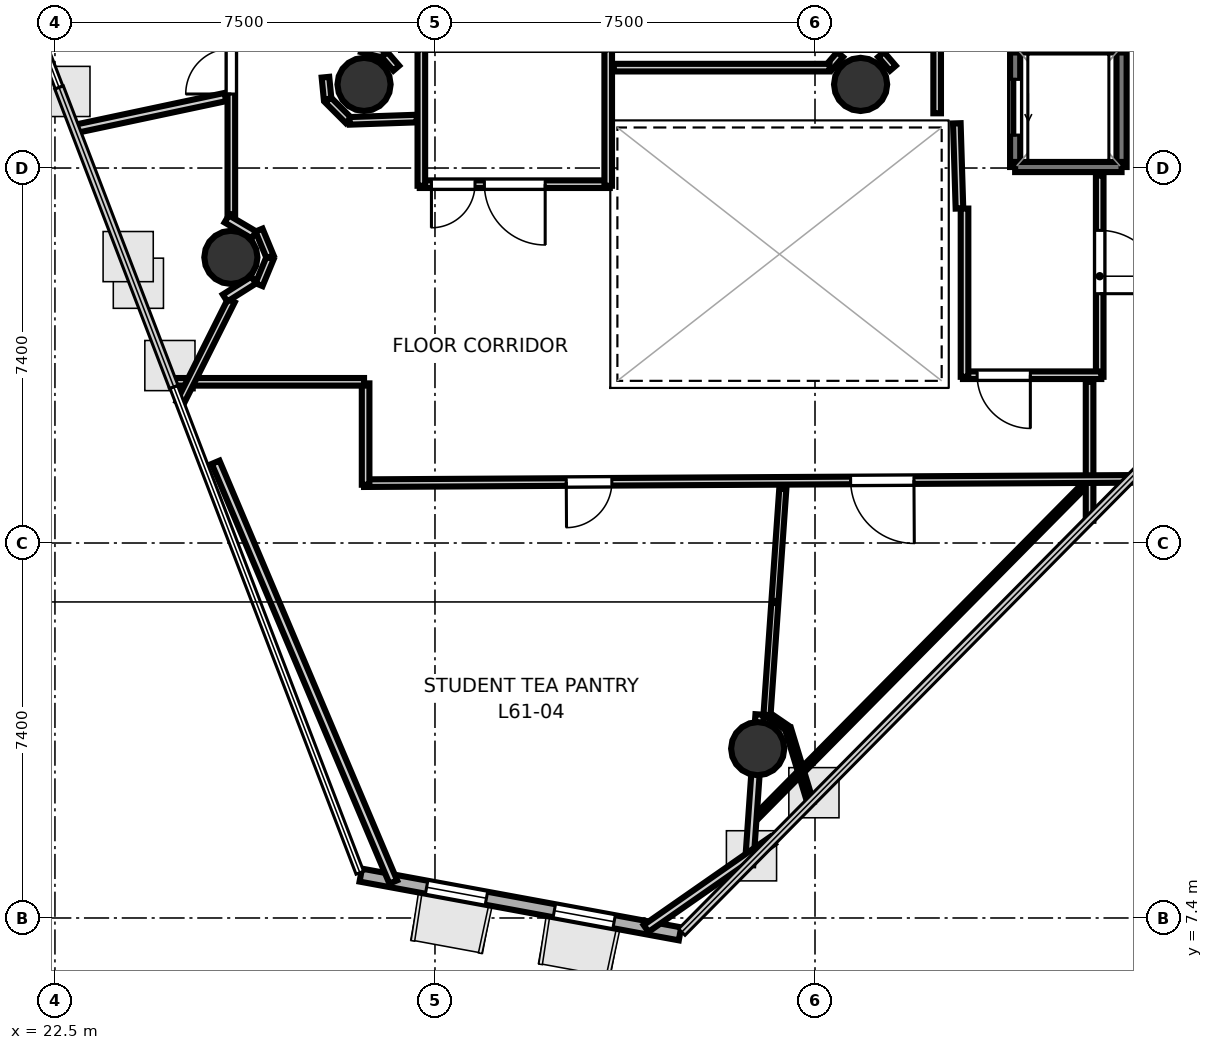
"""IFC4 building model, lengths in metres.
Left out: names, types, materials, properties, quantities, classifications, styles, units other than length and angle.
Written with IfcOpenShell. Run it as: python <this file> out.ifc"""

import sys

from ifc_helpers import new_model, si_unit, direction, frame, frame_2d, origin, origin_2d, place, context, subcontext, project, spatial, rectangle, hollow_circle, extrude, element, fill, save


model = new_model("IFC4")
c1 = context("Model", 3, precision=1e-05, world=origin(), true_north=direction((0.0, 1.0)))
c2 = subcontext(c1, "Body", "Model", "MODEL_VIEW")
j1 = project(units=[si_unit("LENGTHUNIT", "METRE"), si_unit("PLANEANGLEUNIT", "RADIAN")], contexts=[c1])
p1 = place(None, origin())
s1 = spatial("IfcSite", under=j1, at=p1, CompositionType="ELEMENT")
p2 = place(p1, origin())
s2 = spatial("IfcBuilding", under=s1, at=p2, CompositionType="ELEMENT")
p3 = place(p2, frame((0.0, 0.0, 239.0)))
s3 = spatial("IfcBuildingStorey", under=s2, at=p3, CompositionType="ELEMENT", Elevation=239.0)
for number, where, z_axis, x_axis in (
    (1, (28.6, 23.85, 0.0), (0.0, 0.0, 1.0), (1.0, 0.0, 0.0)),
    (2, (38.4, 23.85, 0.0), (0.0, 0.0, 1.0), (1.0, 0.0, 0.0)),
    (3, (25.972, 20.437, 0.0), (0.0, 0.0, 1.0), (1.0, 0.0, 0.0)),
    (4, (36.369, 10.742, 0.0), (0.0, 0.0, 1.0), (1.0, 0.0, 0.0)),
):
    element("IfcColumn", number, at=place(p3, frame(where, z_axis=z_axis, x_axis=x_axis)), inside=s3, PredefinedType="COLUMN", context=c2, shape_type="SweptSolid", body=[
        extrude(hollow_circle(Radius=0.525, WallThickness=0.028, at=origin_2d()), origin(), (0.0, 0.0, 1.0), 3.7),
    ])
p4 = place(p3, frame((28.535, 8.246, 0.0), z_axis=(0.0, 0.0, 1.0), x_axis=(0.983492119214, -0.180950964196, 0.0)))
e5 = element("IfcWall", 5, at=p4, inside=s3, PredefinedType="SOLIDWALL", context=c2, shape_type="SweptSolid", body=[
    extrude(rectangle(XDim=6.406, YDim=0.26, at=frame_2d((3.203, 0.0))), origin(), (0.0, 0.0, 1.0), 3.52),
])
p5 = place(p4, frame((1.322, 0.0, 0.9)))
e6 = element("IfcOpeningElement", 6, at=p5, cuts=e5, PredefinedType="OPENING", context=c2, shape_type="SweptSolid", body=[
    extrude(rectangle(XDim=1.2, YDim=2.0, at=frame_2d((0.6, 1.0))), frame((0.0, 0.14, 0.0), z_axis=(0.0, -1.0, 0.0), x_axis=(1.0, 0.0, 0.0)), (0.0, 0.0, 1.0), 0.28),
])
p6 = place(p4, frame((3.884, 0.0, 0.9)))
e7 = element("IfcOpeningElement", 7, at=p6, cuts=e5, PredefinedType="OPENING", context=c2, shape_type="SweptSolid", body=[
    extrude(rectangle(XDim=1.2, YDim=2.0, at=frame_2d((0.6, 1.0))), frame((0.0, 0.14, 0.0), z_axis=(0.0, -1.0, 0.0), x_axis=(1.0, 0.0, 0.0)), (0.0, 0.0, 1.0), 0.28),
])
p7 = place(p3, frame((43.55, 22.22, 0.0), z_axis=(0.0, 0.0, 1.0), x_axis=(0.0, 1.0, 0.0)))
e8 = element("IfcWall", 8, at=p7, inside=s3, PredefinedType="SOLIDWALL", context=c2, shape_type="SweptSolid", body=[
    extrude(rectangle(XDim=2.36, YDim=0.2, at=frame_2d((1.18, 0.0))), origin(), (0.0, 0.0, 1.0), 3.52),
])
p8 = place(p3, frame((41.45, 22.22, 0.0), z_axis=(0.0, 0.0, 1.0), x_axis=(0.0, 1.0, 0.0)))
e9 = element("IfcWall", 9, at=p8, inside=s3, PredefinedType="SOLIDWALL", context=c2, shape_type="SweptSolid", body=[
    extrude(rectangle(XDim=2.36, YDim=0.2, at=frame_2d((1.18, 0.0))), origin(), (0.0, 0.0, 1.0), 3.52),
])
p9 = place(p8, frame((0.63, 0.0, 0.0)))
e10 = element("IfcOpeningElement", 10, at=p9, cuts=e9, PredefinedType="OPENING", context=c2, shape_type="SweptSolid", body=[
    extrude(rectangle(XDim=1.1, YDim=2.15, at=frame_2d((0.55, 1.075))), frame((0.0, 0.11, 0.0), z_axis=(0.0, -1.0, 0.0), x_axis=(1.0, 0.0, 0.0)), (0.0, 0.0, 1.0), 0.22),
])
for number, where, z_axis, x_axis in (
    (11, (41.45, 24.58, 0.0), (0.0, 0.0, 1.0), (1.0, 0.0, 0.0)),
    (12, (41.45, 22.22, 0.0), (0.0, 0.0, 1.0), (1.0, 0.0, 0.0)),
):
    element("IfcWall", number, at=place(p3, frame(where, z_axis=z_axis, x_axis=x_axis)), inside=s3, PredefinedType="SOLIDWALL", context=c2, shape_type="SweptSolid", body=[
        extrude(rectangle(XDim=2.1, YDim=0.2, at=frame_2d((1.05, 0.0))), origin(), (0.0, 0.0, 1.0), 3.52),
    ])
p10 = place(p3, frame((33.45, 21.881, 0.0), z_axis=(0.0, 0.0, 1.0), x_axis=(-1.0, 0.0, 0.0)))
e13 = element("IfcWall", 13, at=p10, inside=s3, PredefinedType="PARTITIONING", context=c2, shape_type="SweptSolid", body=[
    extrude(rectangle(XDim=3.75, YDim=0.15, at=frame_2d((1.875, 0.0))), origin(), (0.0, 0.0, 1.0), 2.84),
])
p11 = place(p10, frame((1.275, 0.0, 0.0)))
e14 = element("IfcOpeningElement", 14, at=p11, cuts=e13, PredefinedType="OPENING", context=c2, shape_type="SweptSolid", body=[
    extrude(rectangle(XDim=1.2, YDim=2.15, at=frame_2d((0.6, 1.075))), frame((0.0, 0.085, 0.0), z_axis=(0.0, -1.0, 0.0), x_axis=(1.0, 0.0, 0.0)), (0.0, 0.0, 1.0), 0.17),
])
p12 = place(p10, frame((2.66, 0.0, 0.0)))
e15 = element("IfcOpeningElement", 15, at=p12, cuts=e13, PredefinedType="OPENING", context=c2, shape_type="SweptSolid", body=[
    extrude(rectangle(XDim=0.86, YDim=2.05, at=frame_2d((0.43, 1.025))), frame((0.0, 0.085, 0.0), z_axis=(0.0, -1.0, 0.0), x_axis=(1.0, 0.0, 0.0)), (0.0, 0.0, 1.0), 0.17),
])
for number, where, z_axis, x_axis in (
    (16, (29.731, 21.85, 0.0), (0.0, 0.0, 1.0), (0.0, 1.0, 0.0)),
    (17, (33.419, 24.542, 0.0), (0.0, 0.0, 1.0), (0.0, -1.0, 0.0)),
):
    element("IfcWall", number, at=place(p3, frame(where, z_axis=z_axis, x_axis=x_axis)), inside=s3, PredefinedType="PARTITIONING", context=c2, shape_type="SweptSolid", body=[
        extrude(rectangle(XDim=2.692, YDim=0.15, at=frame_2d((1.346, 0.0))), origin(), (0.0, 0.0, 1.0), 2.84),
    ])
p13 = place(p3, frame((40.351, 21.401, 0.0), z_axis=(0.0, 0.0, 1.0), x_axis=(-0.031058045979, 0.999517582527, 0.0)))
e18 = element("IfcWall", 18, at=p13, inside=s3, PredefinedType="PARTITIONING", context=c2, shape_type="SweptSolid", body=[
    extrude(rectangle(XDim=1.682, YDim=0.15, at=frame_2d((0.841, 0.0))), origin(), (0.0, 0.0, 1.0), 2.84),
])
p14 = place(p3, frame((39.911, 23.28, 0.0), z_axis=(0.0, 0.0, 1.0), x_axis=(0.0, 1.0, 0.0)))
e19 = element("IfcWall", 19, at=p14, inside=s3, PredefinedType="PARTITIONING", context=c2, shape_type="SweptSolid", body=[
    extrude(rectangle(XDim=1.48, YDim=0.15, at=frame_2d((0.74, 0.0))), origin(), (0.0, 0.0, 1.0), 2.84),
])
p15 = place(p3, frame((43.119, 22.05, 0.0), z_axis=(0.0, 0.0, 1.0), x_axis=(0.0, -1.0, 0.0)))
e20 = element("IfcWall", 20, at=p15, inside=s3, PredefinedType="PARTITIONING", context=c2, shape_type="SweptSolid", body=[
    extrude(rectangle(XDim=3.97, YDim=0.15, at=frame_2d((1.985, 0.0))), origin(), (0.0, 0.0, 1.0), 2.84),
])
p16 = place(p15, frame((1.08, 0.0, 0.0)))
e21 = element("IfcOpeningElement", 21, at=p16, cuts=e20, PredefinedType="OPENING", context=c2, shape_type="SweptSolid", body=[
    extrude(rectangle(XDim=1.25, YDim=2.2, at=frame_2d((0.625, 1.1))), frame((0.0, 0.085, 0.0), z_axis=(0.0, -1.0, 0.0), x_axis=(1.0, 0.0, 0.0)), (0.0, 0.0, 1.0), 0.17),
])
p17 = place(p3, frame((43.15, 18.111, 0.0), z_axis=(0.0, 0.0, 1.0), x_axis=(-1.0, 0.0, 0.0)))
e22 = element("IfcWall", 22, at=p17, inside=s3, PredefinedType="PARTITIONING", context=c2, shape_type="SweptSolid", body=[
    extrude(rectangle(XDim=2.73, YDim=0.15, at=frame_2d((1.365, 0.0))), origin(), (0.0, 0.0, 1.0), 2.84),
])
p18 = place(p17, frame((1.4, 0.0, 0.0)))
e23 = element("IfcOpeningElement", 23, at=p18, cuts=e22, PredefinedType="OPENING", context=c2, shape_type="SweptSolid", body=[
    extrude(rectangle(XDim=1.05, YDim=2.15, at=frame_2d((0.525, 1.075))), frame((0.0, 0.085, 0.0), z_axis=(0.0, -1.0, 0.0), x_axis=(1.0, 0.0, 0.0)), (0.0, 0.0, 1.0), 0.17),
])
p19 = place(p3, frame((40.451, 18.08, 0.0), z_axis=(0.0, 0.0, 1.0), x_axis=(0.0, 1.0, 0.0)))
e24 = element("IfcWall", 24, at=p19, inside=s3, PredefinedType="PARTITIONING", context=c2, shape_type="SweptSolid", body=[
    extrude(rectangle(XDim=3.32, YDim=0.15, at=frame_2d((1.66, 0.0))), origin(), (0.0, 0.0, 1.0), 2.84),
])
p20 = place(p3, frame((29.236, 24.17, 0.0), z_axis=(0.0, 0.0, 1.0), x_axis=(-0.652260263346, 0.757995084984, 0.0)))
e25 = element("IfcWall", 25, at=p20, inside=s3, PredefinedType="PARTITIONING", context=c2, shape_type="SweptSolid", body=[
    extrude(rectangle(XDim=0.355, YDim=0.15, at=frame_2d((0.178, 0.0))), origin(), (0.0, 0.0, 1.0), 2.84),
])
p21 = place(p3, frame((28.988, 24.45, 0.0), z_axis=(0.0, 0.0, 1.0), x_axis=(-0.968704505916, 0.248216800836, 0.0)))
e26 = element("IfcWall", 26, at=p21, inside=s3, PredefinedType="PARTITIONING", context=c2, shape_type="SweptSolid", body=[
    extrude(rectangle(XDim=0.445, YDim=0.15, at=frame_2d((0.222, 0.0))), origin(), (0.0, 0.0, 1.0), 2.84),
])
p22 = place(p3, frame((39.036, 24.17, 0.0), z_axis=(0.0, 0.0, 1.0), x_axis=(-0.652260263346, 0.757995084984, 0.0)))
e27 = element("IfcWall", 27, at=p22, inside=s3, PredefinedType="PARTITIONING", context=c2, shape_type="SweptSolid", body=[
    extrude(rectangle(XDim=0.355, YDim=0.15, at=frame_2d((0.178, 0.0))), origin(), (0.0, 0.0, 1.0), 2.84),
])
p23 = place(p3, frame((37.996, 24.44, 0.0), z_axis=(0.0, 0.0, 1.0), x_axis=(-0.652425645794, -0.757852740782, 0.0)))
e28 = element("IfcWall", 28, at=p23, inside=s3, PredefinedType="PARTITIONING", context=c2, shape_type="SweptSolid", body=[
    extrude(rectangle(XDim=0.32, YDim=0.15, at=frame_2d((0.16, 0.0))), origin(), (0.0, 0.0, 1.0), 2.84),
])
p24 = place(p3, frame((37.787, 24.181, 0.0), z_axis=(0.0, 0.0, 1.0), x_axis=(-1.0, 0.0, 0.0)))
e29 = element("IfcWall", 29, at=p24, inside=s3, PredefinedType="PARTITIONING", context=c2, shape_type="SweptSolid", body=[
    extrude(rectangle(XDim=4.257, YDim=0.15, at=frame_2d((2.129, 0.0))), origin(), (0.0, 0.0, 1.0), 2.84),
])
p25 = place(p3, frame((27.838, 23.992, 0.0), z_axis=(0.0, 0.0, 1.0), x_axis=(0.098273407977, -0.995159453196, 0.0)))
e30 = element("IfcWall", 30, at=p25, inside=s3, PredefinedType="PARTITIONING", context=c2, shape_type="SweptSolid", body=[
    extrude(rectangle(XDim=0.432, YDim=0.15, at=frame_2d((0.216, 0.0))), origin(), (0.0, 0.0, 1.0), 2.84),
])
p26 = place(p3, frame((27.89, 23.543, 0.0), z_axis=(0.0, 0.0, 1.0), x_axis=(0.707106781187, -0.707106781187, 0.0)))
e31 = element("IfcWall", 31, at=p26, inside=s3, PredefinedType="PARTITIONING", context=c2, shape_type="SweptSolid", body=[
    extrude(rectangle(XDim=0.57, YDim=0.15, at=frame_2d((0.285, 0.0))), origin(), (0.0, 0.0, 1.0), 2.84),
])
p27 = place(p3, frame((28.316, 23.131, 0.0), z_axis=(0.0, 0.0, 1.0), x_axis=(0.999405342193, 0.034481328227, 0.0)))
e32 = element("IfcWall", 32, at=p27, inside=s3, PredefinedType="PARTITIONING", context=c2, shape_type="SweptSolid", body=[
    extrude(rectangle(XDim=1.324, YDim=0.15, at=frame_2d((0.662, 0.0))), origin(), (0.0, 0.0, 1.0), 2.84),
])
p28 = place(p3, frame((42.919, 17.98, 0.0), z_axis=(0.0, 0.0, 1.0), x_axis=(0.0, -1.0, 0.0)))
e33 = element("IfcWall", 33, at=p28, inside=s3, PredefinedType="PARTITIONING", context=c2, shape_type="SweptSolid", body=[
    extrude(rectangle(XDim=2.741, YDim=0.15, at=frame_2d((1.371, 0.0))), origin(), (0.0, 0.0, 1.0), 2.84),
])
p29 = place(p3, frame((43.736, 16.065, 0.0), z_axis=(0.0, 0.0, 1.0), x_axis=(-0.99998451794, -0.005564519729, 0.0)))
e34 = element("IfcWall", 34, at=p29, inside=s3, PredefinedType="PARTITIONING", context=c2, shape_type="SweptSolid", body=[
    extrude(rectangle(XDim=15.137, YDim=0.15, at=frame_2d((7.568, 0.0))), origin(), (0.0, 0.0, 1.0), 2.84),
])
p30 = place(p29, frame((4.283, 0.0, 0.0)))
e35 = element("IfcOpeningElement", 35, at=p30, cuts=e34, PredefinedType="OPENING", context=c2, shape_type="SweptSolid", body=[
    extrude(rectangle(XDim=1.25, YDim=2.2, at=frame_2d((0.625, 1.1))), frame((0.0, 0.085, 0.0), z_axis=(0.0, -1.0, 0.0), x_axis=(1.0, 0.0, 0.0)), (0.0, 0.0, 1.0), 0.17),
])
p31 = place(p29, frame((10.246, 0.0, 0.0)))
e36 = element("IfcOpeningElement", 36, at=p31, cuts=e34, PredefinedType="OPENING", context=c2, shape_type="SweptSolid", body=[
    extrude(rectangle(XDim=0.9, YDim=2.1, at=frame_2d((0.45, 1.05))), frame((0.0, 0.085, 0.0), z_axis=(0.0, -1.0, 0.0), x_axis=(1.0, 0.0, 0.0)), (0.0, 0.0, 1.0), 0.17),
])
p32 = place(p3, frame((28.631, 15.95, 0.0), z_axis=(0.0, 0.0, 1.0), x_axis=(0.0, 1.0, 0.0)))
e37 = element("IfcWall", 37, at=p32, inside=s3, PredefinedType="PARTITIONING", context=c2, shape_type="SweptSolid", body=[
    extrude(rectangle(XDim=2.0, YDim=0.15, at=frame_2d((1.0, 0.0))), origin(), (0.0, 0.0, 1.0), 2.84),
])
p33 = place(p3, frame((28.6, 17.981, 0.0), z_axis=(0.0, 0.0, 1.0), x_axis=(-1.0, 0.0, 0.0)))
e38 = element("IfcWall", 38, at=p33, inside=s3, PredefinedType="PARTITIONING", context=c2, shape_type="SweptSolid", body=[
    extrude(rectangle(XDim=3.814, YDim=0.15, at=frame_2d((1.907, 0.0))), origin(), (0.0, 0.0, 1.0), 2.84),
])
p34 = place(p3, frame((24.967, 17.562, 0.0), z_axis=(0.0, 0.0, 1.0), x_axis=(0.448119529696, 0.893973650118, 0.0)))
e39 = element("IfcWall", 39, at=p34, inside=s3, PredefinedType="PARTITIONING", context=c2, shape_type="SweptSolid", body=[
    extrude(rectangle(XDim=2.263, YDim=0.15, at=frame_2d((1.132, 0.0))), origin(), (0.0, 0.0, 1.0), 2.84),
])
p35 = place(p3, frame((26.527, 19.898, 0.0), z_axis=(0.0, 0.0, 1.0), x_axis=(0.382729887879, 0.923860288639, 0.0)))
e40 = element("IfcWall", 40, at=p35, inside=s3, PredefinedType="PARTITIONING", context=c2, shape_type="SweptSolid", body=[
    extrude(rectangle(XDim=0.57, YDim=0.15, at=frame_2d((0.285, 0.0))), origin(), (0.0, 0.0, 1.0), 2.84),
])
p36 = place(p3, frame((26.746, 20.449, 0.0), z_axis=(0.0, 0.0, 1.0), x_axis=(-0.382881317414, 0.923797541009, 0.0)))
e41 = element("IfcWall", 41, at=p36, inside=s3, PredefinedType="PARTITIONING", context=c2, shape_type="SweptSolid", body=[
    extrude(rectangle(XDim=0.57, YDim=0.15, at=frame_2d((0.285, 0.0))), origin(), (0.0, 0.0, 1.0), 2.84),
])
p37 = place(p3, frame((25.981, 21.289, 0.0), z_axis=(0.0, 0.0, 1.0), x_axis=(0.0, 1.0, 0.0)))
e42 = element("IfcWall", 42, at=p37, inside=s3, PredefinedType="PARTITIONING", context=c2, shape_type="SweptSolid", body=[
    extrude(rectangle(XDim=3.824, YDim=0.15, at=frame_2d((1.912, 0.0))), origin(), (0.0, 0.0, 1.0), 2.84),
])
p38 = place(p37, frame((2.371, 0.0, 0.0)))
e43 = element("IfcOpeningElement", 43, at=p38, cuts=e42, PredefinedType="OPENING", context=c2, shape_type="SweptSolid", body=[
    extrude(rectangle(XDim=0.9, YDim=2.1, at=frame_2d((0.45, 1.05))), frame((0.0, 0.085, 0.0), z_axis=(0.0, -1.0, 0.0), x_axis=(1.0, 0.0, 0.0)), (0.0, 0.0, 1.0), 0.17),
])
p39 = place(p3, frame((37.413, 9.667, 0.0), z_axis=(0.0, 0.0, 1.0), x_axis=(-0.29036160912, 0.956916995329, 0.0)))
e44 = element("IfcWall", 44, at=p39, inside=s3, PredefinedType="PARTITIONING", context=c2, shape_type="SweptSolid", body=[
    extrude(rectangle(XDim=1.53, YDim=0.12, at=frame_2d((0.765, 0.0))), origin(), (0.0, 0.0, 1.0), 2.84),
])
p40 = place(p3, frame((36.956, 11.148, 0.0), z_axis=(0.0, 0.0, 1.0), x_axis=(-0.825070075803, 0.565030415123, 0.0)))
e45 = element("IfcWall", 45, at=p40, inside=s3, PredefinedType="PARTITIONING", context=c2, shape_type="SweptSolid", body=[
    extrude(rectangle(XDim=0.505, YDim=0.105, at=frame_2d((0.252, 0.0))), origin(), (0.0, 0.0, 1.0), 2.84),
])
p41 = place(p3, frame((36.553, 11.406, 0.0), z_axis=(0.0, 0.0, 1.0), x_axis=(0.069757428916, 0.997563983467, 0.0)))
e46 = element("IfcWall", 46, at=p41, inside=s3, PredefinedType="PARTITIONING", context=c2, shape_type="SweptSolid", body=[
    extrude(rectangle(XDim=4.473, YDim=0.14, at=frame_2d((2.236, 0.0))), origin(), (0.0, 0.0, 1.0), 2.84),
])
p42 = place(p3, frame((42.77, 15.892, 0.0), z_axis=(0.0, 0.0, 1.0), x_axis=(-0.703226719555, -0.71096566788, 0.0)))
e47 = element("IfcWall", 47, at=p42, inside=s3, PredefinedType="PARTITIONING", context=c2, shape_type="SweptSolid", body=[
    extrude(rectangle(XDim=9.117, YDim=0.105, at=frame_2d((4.559, 0.0))), origin(), (0.0, 0.0, 1.0), 2.84),
])
p43 = place(p3, frame((25.864, 23.601, 0.0), z_axis=(0.0, 0.0, 1.0), x_axis=(-0.978142599983, -0.207935216108, 0.0)))
e48 = element("IfcWall", 48, at=p43, inside=s3, PredefinedType="PLUMBINGWALL", context=c2, shape_type="SweptSolid", body=[
    extrude(rectangle(XDim=3.055, YDim=0.165, at=frame_2d((1.528, 0.0))), origin(), (0.0, 0.0, 1.0), 2.84),
])
p44 = place(p3, frame((25.89, 21.196, 0.0), z_axis=(0.0, 0.0, 1.0), x_axis=(0.861480264841, -0.507791052785, 0.0)))
e49 = element("IfcWall", 49, at=p44, inside=s3, PredefinedType="PLUMBINGWALL", context=c2, shape_type="SweptSolid", body=[
    extrude(rectangle(XDim=0.623, YDim=0.165, at=frame_2d((0.311, 0.0))), origin(), (0.0, 0.0, 1.0), 2.84),
])
p45 = place(p3, frame((26.422, 19.991, 0.0), z_axis=(0.0, 0.0, 1.0), x_axis=(-0.84577514661, -0.533539503108, 0.0)))
e50 = element("IfcWall", 50, at=p45, inside=s3, PredefinedType="PLUMBINGWALL", context=c2, shape_type="SweptSolid", body=[
    extrude(rectangle(XDim=0.668, YDim=0.165, at=frame_2d((0.334, 0.0))), origin(), (0.0, 0.0, 1.0), 2.84),
])
p46 = place(p3, frame((36.407, 11.416, 0.0), z_axis=(0.0, 0.0, 1.0), x_axis=(-0.069731163391, -0.997565819809, 0.0)))
e51 = element("IfcWall", 51, at=p46, inside=s3, PredefinedType="PLUMBINGWALL", context=c2, shape_type="SweptSolid", body=[
    extrude(rectangle(XDim=2.976, YDim=0.165, at=frame_2d((1.488, 0.0))), origin(), (0.0, 0.0, 1.0), 2.84),
])
p47 = place(p3, frame((36.66, 8.931, 0.0), z_axis=(0.0, 0.0, 1.0), x_axis=(-0.820456391153, -0.571709113287, 0.0)))
e52 = element("IfcWall", 52, at=p47, inside=s3, PredefinedType="PLUMBINGWALL", context=c2, shape_type="SweptSolid", body=[
    extrude(rectangle(XDim=3.04, YDim=0.165, at=frame_2d((1.52, 0.0))), origin(), (0.0, 0.0, 1.0), 2.84),
])
p48 = place(p3, frame((29.177, 8.111, 0.0), z_axis=(0.0, 0.0, 1.0), x_axis=(-0.389794064953, 0.920902050669, 0.0)))
e53 = element("IfcWall", 53, at=p48, inside=s3, PredefinedType="PLUMBINGWALL", context=c2, shape_type="SweptSolid", body=[
    extrude(rectangle(XDim=8.994, YDim=0.165, at=frame_2d((4.497, 0.0))), origin(), (0.0, 0.0, 1.0), 2.84),
])
p49 = place(p9, origin())
e54 = element("IfcDoor", 54, at=p49, inside=s3, OperationType="SLIDING_TO_LEFT", PredefinedType="DOOR", context=c2, shape_type="SweptSolid", body=[
    extrude(rectangle(XDim=1.1, YDim=2.15, at=frame_2d((0.55, 1.075))), frame((0.0, 0.025, 0.0), z_axis=(0.0, -1.0, 0.0), x_axis=(1.0, 0.0, 0.0)), (0.0, 0.0, 1.0), 0.05),
])
fill(e10, e54)
p50 = place(p11, origin())
e55 = element("IfcDoor", 55, at=p50, inside=s3, OperationType="SINGLE_SWING_LEFT", PredefinedType="DOOR", context=c2, shape_type="SweptSolid", body=[
    extrude(rectangle(XDim=1.2, YDim=2.15, at=frame_2d((0.6, 1.075))), frame((0.0, 0.025, 0.0), z_axis=(0.0, -1.0, 0.0), x_axis=(1.0, 0.0, 0.0)), (0.0, 0.0, 1.0), 0.05),
])
fill(e14, e55)
p51 = place(p18, origin())
e56 = element("IfcDoor", 56, at=p51, inside=s3, OperationType="SINGLE_SWING_LEFT", PredefinedType="DOOR", context=c2, shape_type="SweptSolid", body=[
    extrude(rectangle(XDim=1.05, YDim=2.15, at=frame_2d((0.525, 1.075))), frame((0.0, 0.025, 0.0), z_axis=(0.0, -1.0, 0.0), x_axis=(1.0, 0.0, 0.0)), (0.0, 0.0, 1.0), 0.05),
])
fill(e23, e56)
p52 = place(p12, origin())
e57 = element("IfcDoor", 57, at=p52, inside=s3, OperationType="SINGLE_SWING_RIGHT", PredefinedType="DOOR", context=c2, shape_type="SweptSolid", body=[
    extrude(rectangle(XDim=0.86, YDim=2.05, at=frame_2d((0.43, 1.025))), frame((0.0, 0.025, 0.0), z_axis=(0.0, -1.0, 0.0), x_axis=(1.0, 0.0, 0.0)), (0.0, 0.0, 1.0), 0.05),
])
fill(e15, e57)
p53 = place(p30, origin())
e58 = element("IfcDoor", 58, at=p53, inside=s3, OperationType="SINGLE_SWING_LEFT", PredefinedType="DOOR", context=c2, shape_type="SweptSolid", body=[
    extrude(rectangle(XDim=1.25, YDim=2.2, at=frame_2d((0.625, 1.1))), frame((0.0, 0.025, 0.0), z_axis=(0.0, -1.0, 0.0), x_axis=(1.0, 0.0, 0.0)), (0.0, 0.0, 1.0), 0.05),
])
fill(e35, e58)
p54 = place(p16, origin())
e59 = element("IfcDoor", 59, at=p54, inside=s3, OperationType="SINGLE_SWING_RIGHT", PredefinedType="DOOR", context=c2, shape_type="SweptSolid", body=[
    extrude(rectangle(XDim=1.25, YDim=2.2, at=frame_2d((0.625, 1.1))), frame((0.0, 0.025, 0.0), z_axis=(0.0, -1.0, 0.0), x_axis=(1.0, 0.0, 0.0)), (0.0, 0.0, 1.0), 0.05),
])
fill(e21, e59)
p55 = place(p38, origin())
e60 = element("IfcDoor", 60, at=p55, inside=s3, OperationType="SINGLE_SWING_LEFT", PredefinedType="DOOR", context=c2, shape_type="SweptSolid", body=[
    extrude(rectangle(XDim=0.9, YDim=2.1, at=frame_2d((0.45, 1.05))), frame((0.0, 0.025, 0.0), z_axis=(0.0, -1.0, 0.0), x_axis=(1.0, 0.0, 0.0)), (0.0, 0.0, 1.0), 0.05),
])
fill(e43, e60)
p56 = place(p31, origin())
e61 = element("IfcDoor", 61, at=p56, inside=s3, OperationType="SINGLE_SWING_RIGHT", PredefinedType="DOOR", context=c2, shape_type="SweptSolid", body=[
    extrude(rectangle(XDim=0.9, YDim=2.1, at=frame_2d((0.45, 1.05))), frame((0.0, 0.025, 0.0), z_axis=(0.0, -1.0, 0.0), x_axis=(1.0, 0.0, 0.0)), (0.0, 0.0, 1.0), 0.05),
])
fill(e36, e61)
p57 = place(p5, origin())
e62 = element("IfcWindow", 62, at=p57, inside=s3, PartitioningType="SINGLE_PANEL", PredefinedType="WINDOW", context=c2, shape_type="SweptSolid", body=[
    extrude(rectangle(XDim=1.2, YDim=2.0, at=frame_2d((0.6, 1.0))), frame((0.0, 0.03, 0.0), z_axis=(0.0, -1.0, 0.0), x_axis=(1.0, 0.0, 0.0)), (0.0, 0.0, 1.0), 0.06),
])
fill(e6, e62)
p58 = place(p6, origin())
e63 = element("IfcWindow", 63, at=p58, inside=s3, PartitioningType="SINGLE_PANEL", PredefinedType="WINDOW", context=c2, shape_type="SweptSolid", body=[
    extrude(rectangle(XDim=1.2, YDim=2.0, at=frame_2d((0.6, 1.0))), frame((0.0, 0.03, 0.0), z_axis=(0.0, -1.0, 0.0), x_axis=(1.0, 0.0, 0.0)), (0.0, 0.0, 1.0), 0.06),
])
fill(e7, e63)
save(model, sys.argv[1])
